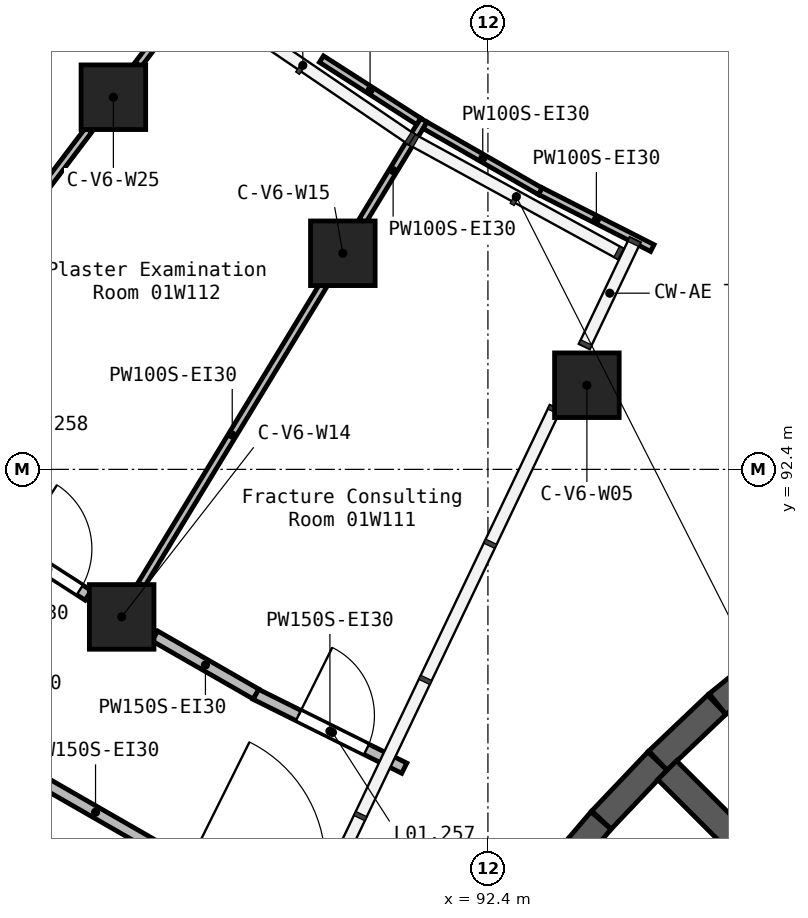
"""IFC4 building model, lengths in metres.
Left out: names, types, materials, properties, quantities, classifications, styles, units other than length and angle.
Written with IfcOpenShell. Run it as: python <this file> out.ifc"""

import sys

from ifc_helpers import new_model, si_unit, direction, frame, frame_2d, origin, origin_2d, place, context, subcontext, project, spatial, rectangle, extrude, element, fill, save


model = new_model("IFC4")
c1 = context("Model", 3, precision=1e-05, world=origin(), true_north=direction((0.0, 1.0)))
c2 = subcontext(c1, "Body", "Model", "MODEL_VIEW")
j1 = project(units=[si_unit("LENGTHUNIT", "METRE"), si_unit("PLANEANGLEUNIT", "RADIAN")], contexts=[c1])
p1 = place(None, origin())
s1 = spatial("IfcSite", under=j1, at=p1, CompositionType="ELEMENT")
p2 = place(p1, origin())
s2 = spatial("IfcBuilding", under=s1, at=p2, CompositionType="ELEMENT")
p3 = place(p2, frame((0.0, 0.0, 5.4)))
s3 = spatial("IfcBuildingStorey", under=s2, at=p3, CompositionType="ELEMENT", Elevation=5.4)
for number, where, z_axis, x_axis in (
    (1, (87.472, 97.296, 0.0), (0.0, 0.0, 1.0), (1.0, 0.0, 0.0)),
    (2, (87.581, 90.459, 0.0), (0.0, 0.0, 1.0), (1.0, 0.0, 0.0)),
    (3, (90.491, 95.243, 0.0), (0.0, 0.0, 1.0), (1.0, 0.0, 0.0)),
    (4, (93.702, 93.507, 0.0), (0.0, 0.0, 1.0), (1.0, 0.0, 0.0)),
):
    element("IfcColumn", number, at=place(p3, frame(where, z_axis=z_axis, x_axis=x_axis)), inside=s3, PredefinedType="COLUMN", context=c2, shape_type="SweptSolid", body=[
        extrude(rectangle(XDim=0.85, YDim=0.85, at=origin_2d()), origin(), (0.0, 0.0, 1.0), 4.5),
    ])
p4 = place(p3, frame((93.195, 86.969, 0.0), z_axis=(0.0, 0.0, 1.0), x_axis=(0.649301127712, 0.760531423119, 0.0)))
e5 = element("IfcWall", 5, at=p4, inside=s3, PredefinedType="SHEAR", context=c2, shape_type="SweptSolid", body=[
    extrude(rectangle(XDim=1.067, YDim=0.35, at=frame_2d((0.533, 0.0))), origin(), (0.0, 0.0, 1.0), 4.5),
])
p5 = place(p3, frame((93.894, 87.787, 0.0), z_axis=(0.0, 0.0, 1.0), x_axis=(0.688725463476, 0.725022231356, 0.0)))
e6 = element("IfcWall", 6, at=p5, inside=s3, PredefinedType="SHEAR", context=c2, shape_type="SweptSolid", body=[
    extrude(rectangle(XDim=1.07, YDim=0.35, at=frame_2d((0.535, 0.0))), origin(), (0.0, 0.0, 1.0), 4.5),
])
p6 = place(p3, frame((94.637, 88.569, 0.0), z_axis=(0.0, 0.0, 1.0), x_axis=(0.724948027673, 0.688803569367, 0.0)))
e7 = element("IfcWall", 7, at=p6, inside=s3, PredefinedType="SHEAR", context=c2, shape_type="SweptSolid", body=[
    extrude(rectangle(XDim=1.067, YDim=0.35, at=frame_2d((0.534, 0.0))), origin(), (0.0, 0.0, 1.0), 4.5),
])
p7 = place(p3, frame((94.758, 88.442, 0.0), z_axis=(0.0, 0.0, 1.0), x_axis=(0.707106781187, -0.707106781187, 0.0)))
e8 = element("IfcWall", 8, at=p7, inside=s3, PredefinedType="SHEAR", context=c2, shape_type="SweptSolid", body=[
    extrude(rectangle(XDim=3.249, YDim=0.35, at=frame_2d((1.625, 0.0))), origin(), (0.0, 0.0, 1.0), 4.5),
])
p8 = place(p3, frame((97.087, 90.662, 0.0), z_axis=(0.0, 0.0, 1.0), x_axis=(-0.777231602748, -0.629214618146, 0.0)))
e9 = element("IfcWall", 9, at=p8, inside=s3, PredefinedType="SHEAR", context=c2, shape_type="SweptSolid", body=[
    extrude(rectangle(XDim=2.143, YDim=0.35, at=frame_2d((1.071, 0.0))), origin(), (0.0, 0.0, 1.0), 4.5),
])
p9 = place(p3, frame((86.268, 88.446, 0.0), z_axis=(0.0, 0.0, 1.0), x_axis=(0.867212921502, -0.497937494852, 0.0)))
e10 = element("IfcWall", 10, at=p9, inside=s3, PredefinedType="PARTITIONING", context=c2, shape_type="SweptSolid", body=[
    extrude(rectangle(XDim=2.235, YDim=0.15, at=frame_2d((1.118, 0.0))), origin(), (0.0, 0.0, 1.0), 4.15),
])
p10 = place(p3, frame((89.343, 89.442, 0.0), z_axis=(0.0, 0.0, 1.0), x_axis=(0.895274815557, -0.445514314731, 0.0)))
e11 = element("IfcWall", 11, at=p10, inside=s3, PredefinedType="PARTITIONING", context=c2, shape_type="SweptSolid", body=[
    extrude(rectangle(XDim=2.185, YDim=0.15, at=frame_2d((1.092, 0.0))), origin(), (0.0, 0.0, 1.0), 4.15),
])
p11 = place(p10, frame((0.63, 0.0, 0.0)))
e12 = element("IfcOpeningElement", 12, at=p11, cuts=e11, PredefinedType="OPENING", context=c2, shape_type="SweptSolid", body=[
    extrude(rectangle(XDim=1.0, YDim=2.1, at=frame_2d((0.5, 1.05))), frame((0.0, 0.085, 0.0), z_axis=(0.0, -1.0, 0.0), x_axis=(1.0, 0.0, 0.0)), (0.0, 0.0, 1.0), 0.17),
])
p12 = place(p3, frame((85.744, 91.642, 0.0), z_axis=(0.0, 0.0, 1.0), x_axis=(0.840848932624, -0.54126987031, 0.0)))
e13 = element("IfcWall", 13, at=p12, inside=s3, PredefinedType="PARTITIONING", context=c2, shape_type="SweptSolid", body=[
    extrude(rectangle(XDim=1.662, YDim=0.15, at=frame_2d((0.831, 0.0))), origin(), (0.0, 0.0, 1.0), 4.15),
])
p13 = place(p12, frame((0.53, 0.0, 0.0)))
e14 = element("IfcOpeningElement", 14, at=p13, cuts=e13, PredefinedType="OPENING", context=c2, shape_type="SweptSolid", body=[
    extrude(rectangle(XDim=1.0, YDim=2.1, at=frame_2d((0.5, 1.05))), frame((0.0, 0.085, 0.0), z_axis=(0.0, -1.0, 0.0), x_axis=(1.0, 0.0, 0.0)), (0.0, 0.0, 1.0), 0.17),
])
p14 = place(p3, frame((88.018, 90.208, 0.0), z_axis=(0.0, 0.0, 1.0), x_axis=(0.867174234795, -0.498004865947, 0.0)))
e15 = element("IfcWall", 15, at=p14, inside=s3, PredefinedType="PARTITIONING", context=c2, shape_type="SweptSolid", body=[
    extrude(rectangle(XDim=1.535, YDim=0.15, at=frame_2d((0.768, 0.0))), origin(), (0.0, 0.0, 1.0), 4.15),
])
p15 = place(p3, frame((84.418, 93.26, 0.0), z_axis=(0.0, 0.0, 1.0), x_axis=(0.603501117064, 0.797362152163, 0.0)))
e16 = element("IfcWall", 16, at=p15, inside=s3, PredefinedType="PARTITIONING", context=c2, shape_type="SweptSolid", body=[
    extrude(rectangle(XDim=4.522, YDim=0.1, at=frame_2d((2.261, 0.0))), origin(), (0.0, 0.0, 1.0), 4.15),
])
p16 = place(p3, frame((87.798, 97.726, 0.0), z_axis=(0.0, 0.0, 1.0), x_axis=(0.603534256712, 0.797337068607, 0.0)))
e17 = element("IfcWall", 17, at=p16, inside=s3, PredefinedType="PARTITIONING", context=c2, shape_type="SweptSolid", body=[
    extrude(rectangle(XDim=1.512, YDim=0.1, at=frame_2d((0.756, 0.0))), origin(), (0.0, 0.0, 1.0), 4.15),
])
p17 = place(p3, frame((87.84, 90.885, 0.0), z_axis=(0.0, 0.0, 1.0), x_axis=(0.519618801015, 0.854398210223, 0.0)))
e18 = element("IfcWall", 18, at=p17, inside=s3, PredefinedType="PARTITIONING", context=c2, shape_type="SweptSolid", body=[
    extrude(rectangle(XDim=4.603, YDim=0.1, at=frame_2d((2.302, 0.0))), origin(), (0.0, 0.0, 1.0), 4.15),
])
p18 = place(p3, frame((90.75, 95.668, 0.0), z_axis=(0.0, 0.0, 1.0), x_axis=(0.519552672181, 0.854438424247, 0.0)))
e19 = element("IfcWall", 19, at=p18, inside=s3, PredefinedType="PARTITIONING", context=c2, shape_type="SweptSolid", body=[
    extrude(rectangle(XDim=1.552, YDim=0.1, at=frame_2d((0.776, 0.0))), origin(), (0.0, 0.0, 1.0), 4.15),
])
p19 = place(p3, frame((91.572, 96.928, 0.0), z_axis=(0.0, 0.0, 1.0), x_axis=(0.867607434085, -0.497249776591, 0.0)))
e20 = element("IfcWall", 20, at=p19, inside=s3, PredefinedType="PARTITIONING", context=c2, shape_type="SweptSolid", body=[
    extrude(rectangle(XDim=1.751, YDim=0.1, at=frame_2d((0.875, 0.0))), origin(), (0.0, 0.0, 1.0), 4.15),
])
p20 = place(p3, frame((93.09, 96.06, 0.0), z_axis=(0.0, 0.0, 1.0), x_axis=(0.891511605142, -0.452997856393, 0.0)))
e21 = element("IfcWall", 21, at=p20, inside=s3, PredefinedType="PARTITIONING", context=c2, shape_type="SweptSolid", body=[
    extrude(rectangle(XDim=1.652, YDim=0.1, at=frame_2d((0.826, 0.0))), origin(), (0.0, 0.0, 1.0), 4.15),
])
p21 = place(p3, frame((90.21, 97.798, 0.0), z_axis=(0.0, 0.0, 1.0), x_axis=(0.841976481819, -0.539514229713, 0.0)))
e22 = element("IfcWall", 22, at=p21, inside=s3, PredefinedType="PARTITIONING", context=c2, shape_type="SweptSolid", body=[
    extrude(rectangle(XDim=1.519, YDim=0.1, at=frame_2d((0.76, 0.0))), origin(), (0.0, 0.0, 1.0), 4.15),
])
p22 = place(p11, origin())
e23 = element("IfcDoor", 23, at=p22, inside=s3, OperationType="SINGLE_SWING_RIGHT", PredefinedType="DOOR", context=c2, shape_type="SweptSolid", body=[
    extrude(rectangle(XDim=1.0, YDim=2.1, at=frame_2d((0.5, 1.05))), frame((0.0, 0.025, 0.0), z_axis=(0.0, -1.0, 0.0), x_axis=(1.0, 0.0, 0.0)), (0.0, 0.0, 1.0), 0.05),
])
fill(e12, e23)
p23 = place(p13, origin())
e24 = element("IfcDoor", 24, at=p23, inside=s3, OperationType="SINGLE_SWING_RIGHT", PredefinedType="DOOR", context=c2, shape_type="SweptSolid", body=[
    extrude(rectangle(XDim=1.0, YDim=2.1, at=frame_2d((0.5, 1.05))), frame((0.0, 0.025, 0.0), z_axis=(0.0, -1.0, 0.0), x_axis=(1.0, 0.0, 0.0)), (0.0, 0.0, 1.0), 0.05),
])
fill(e14, e24)
save(model, sys.argv[1])
